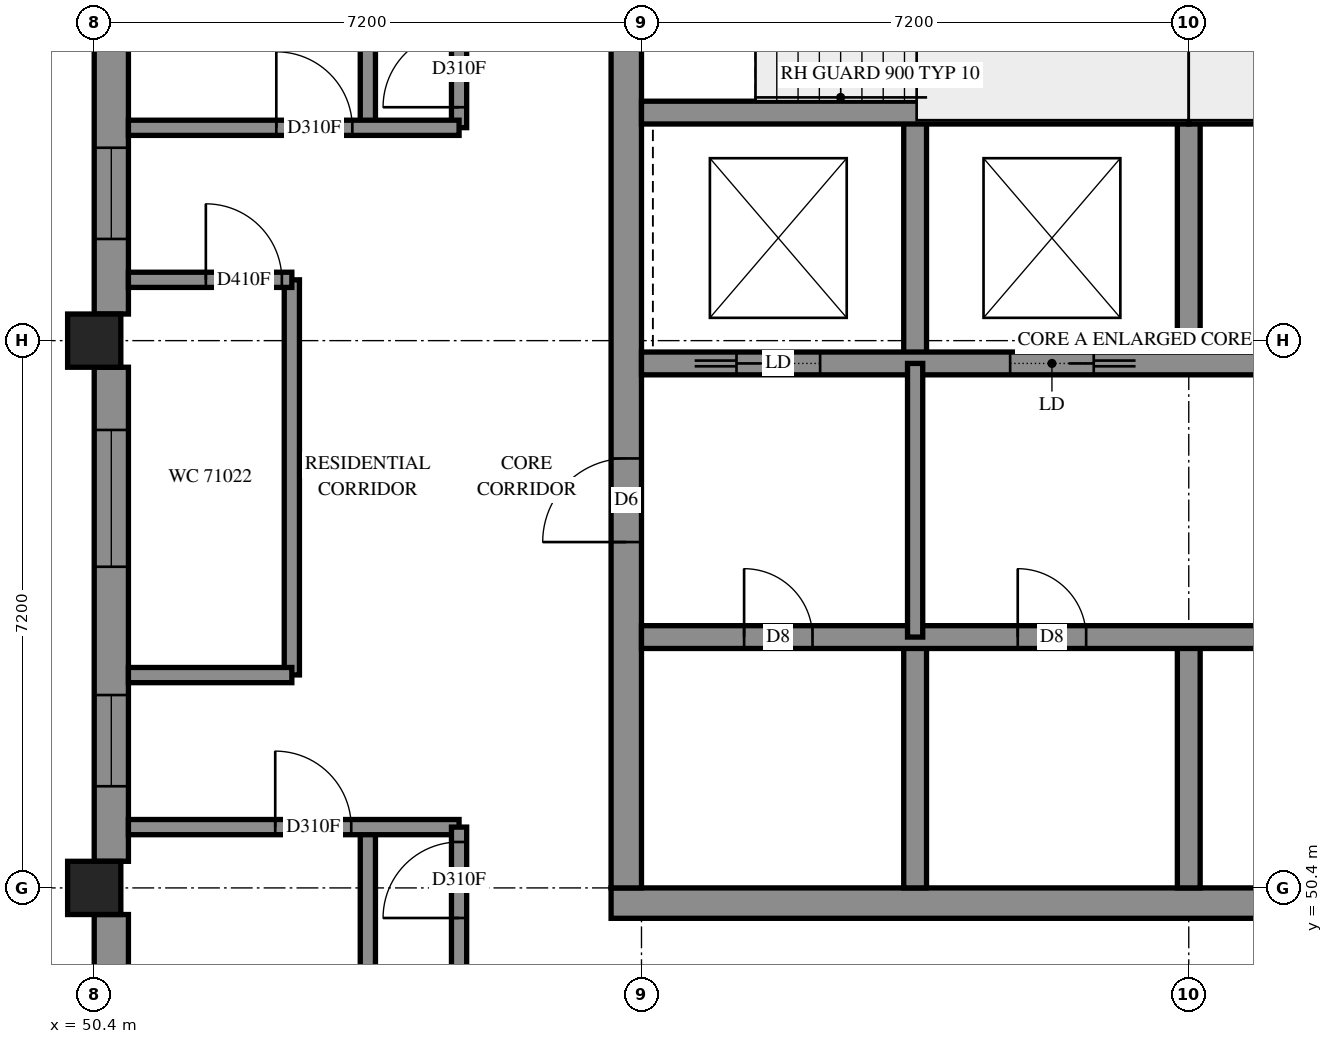
"""IFC4 building model, lengths in metres.
Left out: names, types, materials, properties, quantities, classifications, styles, units other than length and angle.
Written with IfcOpenShell. Run it as: python <this file> out.ifc"""

import sys

from ifc_helpers import new_model, si_unit, direction, frame, frame_2d, origin, origin_2d, place, context, subcontext, project, spatial, rectangle, extrude, element, fill, save


model = new_model("IFC4")
c1 = context("Model", 3, precision=1e-05, world=origin(), true_north=direction((0.0, 1.0)))
c2 = subcontext(c1, "Body", "Model", "MODEL_VIEW")
j1 = project(units=[si_unit("LENGTHUNIT", "METRE"), si_unit("PLANEANGLEUNIT", "RADIAN")], contexts=[c1])
p1 = place(None, origin())
s1 = spatial("IfcSite", under=j1, at=p1, CompositionType="ELEMENT")
p2 = place(p1, origin())
s2 = spatial("IfcBuilding", under=s1, at=p2, CompositionType="ELEMENT")
p3 = place(p2, frame((0.0, 0.0, 260.8)))
s3 = spatial("IfcBuildingStorey", under=s2, at=p3, CompositionType="ELEMENT", Elevation=260.8)
for number, where, z_axis, x_axis in (
    (1, (50.4, 50.4, 0.0), (0.0, 0.0, 1.0), (1.0, 0.0, 0.0)),
    (2, (50.4, 57.6, 0.0), (0.0, 0.0, 1.0), (1.0, 0.0, 0.0)),
):
    element("IfcColumn", number, at=place(p3, frame(where, z_axis=z_axis, x_axis=x_axis)), inside=s3, PredefinedType="COLUMN", context=c2, shape_type="SweptSolid", body=[
        extrude(rectangle(XDim=0.7, YDim=0.7, at=origin_2d()), origin(), (0.0, 0.0, 1.0), 3.1),
    ])
p4 = place(p3, frame((57.2, 50.2, -0.3), z_axis=(0.0, 0.0, 1.0), x_axis=(1.0, 0.0, 0.0)))
e3 = element("IfcWall", 3, at=p4, inside=s3, PredefinedType="SHEAR", context=c2, shape_type="SweptSolid", body=[
    extrude(rectangle(XDim=15.2, YDim=0.4, at=frame_2d((7.6, 0.0))), origin(), (0.0, 0.0, 1.0), 2.7),
])
p5 = place(p3, frame((57.4, 50.4, -0.3), z_axis=(0.0, 0.0, 1.0), x_axis=(0.0, 1.0, 0.0)))
e4 = element("IfcWall", 4, at=p5, inside=s3, PredefinedType="SHEAR", context=c2, shape_type="SweptSolid", body=[
    extrude(rectangle(XDim=14.4, YDim=0.4, at=frame_2d((7.2, 0.0))), origin(), (0.0, 0.0, 1.0), 2.7),
])
p6 = place(p5, frame((4.55, 0.0, 0.3)))
e5 = element("IfcOpeningElement", 5, at=p6, cuts=e4, PredefinedType="OPENING", context=c2, shape_type="SweptSolid", body=[
    extrude(rectangle(XDim=1.1, YDim=2.1, at=frame_2d((0.55, 1.05))), frame((0.0, 0.21, 0.0), z_axis=(0.0, -1.0, 0.0), x_axis=(1.0, 0.0, 0.0)), (0.0, 0.0, 1.0), 0.42),
])
p7 = place(p5, frame((11.35, 0.0, 0.3)))
e6 = element("IfcOpeningElement", 6, at=p7, cuts=e4, PredefinedType="OPENING", context=c2, shape_type="SweptSolid", body=[
    extrude(rectangle(XDim=1.1, YDim=2.1, at=frame_2d((0.55, 1.05))), frame((0.0, 0.21, 0.0), z_axis=(0.0, -1.0, 0.0), x_axis=(1.0, 0.0, 0.0)), (0.0, 0.0, 1.0), 0.42),
])
for number, where, z_axis, x_axis in (
    (7, (61.2, 50.4, 0.0), (0.0, 0.0, 1.0), (0.0, 1.0, 0.0)),
    (8, (61.2, 57.3, 0.0), (0.0, 0.0, 1.0), (0.0, 1.0, 0.0)),
    (9, (64.8, 50.4, 0.0), (0.0, 0.0, 1.0), (0.0, 1.0, 0.0)),
    (10, (64.8, 57.3, 0.0), (0.0, 0.0, 1.0), (0.0, 1.0, 0.0)),
):
    element("IfcWall", number, at=place(p3, frame(where, z_axis=z_axis, x_axis=x_axis)), inside=s3, PredefinedType="SOLIDWALL", context=c2, shape_type="SweptSolid", body=[
        extrude(rectangle(XDim=3.3, YDim=0.3, at=frame_2d((1.65, 0.0))), origin(), (0.0, 0.0, 1.0), 3.1),
    ])
p8 = place(p3, frame((57.6, 53.7, 0.0), z_axis=(0.0, 0.0, 1.0), x_axis=(1.0, 0.0, 0.0)))
e11 = element("IfcWall", 11, at=p8, inside=s3, PredefinedType="SOLIDWALL", context=c2, shape_type="SweptSolid", body=[
    extrude(rectangle(XDim=14.4, YDim=0.3, at=frame_2d((7.2, 0.0))), origin(), (0.0, 0.0, 1.0), 3.1),
])
p9 = place(p8, frame((1.35, 0.0, 0.0)))
e12 = element("IfcOpeningElement", 12, at=p9, cuts=e11, PredefinedType="OPENING", context=c2, shape_type="SweptSolid", body=[
    extrude(rectangle(XDim=0.9, YDim=2.1, at=frame_2d((0.45, 1.05))), frame((0.0, 0.16, 0.0), z_axis=(0.0, -1.0, 0.0), x_axis=(1.0, 0.0, 0.0)), (0.0, 0.0, 1.0), 0.32),
])
p10 = place(p8, frame((4.95, 0.0, 0.0)))
e13 = element("IfcOpeningElement", 13, at=p10, cuts=e11, PredefinedType="OPENING", context=c2, shape_type="SweptSolid", body=[
    extrude(rectangle(XDim=0.9, YDim=2.1, at=frame_2d((0.45, 1.05))), frame((0.0, 0.16, 0.0), z_axis=(0.0, -1.0, 0.0), x_axis=(1.0, 0.0, 0.0)), (0.0, 0.0, 1.0), 0.32),
])
p11 = place(p8, frame((8.55, 0.0, 0.0)))
e14 = element("IfcOpeningElement", 14, at=p11, cuts=e11, PredefinedType="OPENING", context=c2, shape_type="SweptSolid", body=[
    extrude(rectangle(XDim=0.9, YDim=2.1, at=frame_2d((0.45, 1.05))), frame((0.0, 0.16, 0.0), z_axis=(0.0, -1.0, 0.0), x_axis=(1.0, 0.0, 0.0)), (0.0, 0.0, 1.0), 0.32),
])
p12 = place(p8, frame((12.05, 0.0, 0.0)))
e15 = element("IfcOpeningElement", 15, at=p12, cuts=e11, PredefinedType="OPENING", context=c2, shape_type="SweptSolid", body=[
    extrude(rectangle(XDim=1.1, YDim=2.1, at=frame_2d((0.55, 1.05))), frame((0.0, 0.16, 0.0), z_axis=(0.0, -1.0, 0.0), x_axis=(1.0, 0.0, 0.0)), (0.0, 0.0, 1.0), 0.32),
])
p13 = place(p3, frame((57.6, 57.3, 0.0), z_axis=(0.0, 0.0, 1.0), x_axis=(1.0, 0.0, 0.0)))
e16 = element("IfcWall", 16, at=p13, inside=s3, PredefinedType="SOLIDWALL", context=c2, shape_type="SweptSolid", body=[
    extrude(rectangle(XDim=14.4, YDim=0.3, at=frame_2d((7.2, 0.0))), origin(), (0.0, 0.0, 1.0), 3.1),
])
p14 = place(p13, frame((8.55, 0.0, 0.0)))
e17 = element("IfcOpeningElement", 17, at=p14, cuts=e16, PredefinedType="OPENING", context=c2, shape_type="SweptSolid", body=[
    extrude(rectangle(XDim=0.9, YDim=2.1, at=frame_2d((0.45, 1.05))), frame((0.0, 0.16, 0.0), z_axis=(0.0, -1.0, 0.0), x_axis=(1.0, 0.0, 0.0)), (0.0, 0.0, 1.0), 0.32),
])
p15 = place(p13, frame((1.25, 0.0, 0.0)))
e18 = element("IfcOpeningElement", 18, at=p15, cuts=e16, PredefinedType="OPENING", context=c2, shape_type="SweptSolid", body=[
    extrude(rectangle(XDim=1.1, YDim=2.1, at=frame_2d((0.55, 1.05))), frame((0.0, 0.16, 0.0), z_axis=(0.0, -1.0, 0.0), x_axis=(1.0, 0.0, 0.0)), (0.0, 0.0, 1.0), 0.32),
])
p16 = place(p13, frame((4.85, 0.0, 0.0)))
e19 = element("IfcOpeningElement", 19, at=p16, cuts=e16, PredefinedType="OPENING", context=c2, shape_type="SweptSolid", body=[
    extrude(rectangle(XDim=1.1, YDim=2.1, at=frame_2d((0.55, 1.05))), frame((0.0, 0.16, 0.0), z_axis=(0.0, -1.0, 0.0), x_axis=(1.0, 0.0, 0.0)), (0.0, 0.0, 1.0), 0.32),
])
p17 = place(p13, frame((12.05, 0.0, 0.0)))
e20 = element("IfcOpeningElement", 20, at=p17, cuts=e16, PredefinedType="OPENING", context=c2, shape_type="SweptSolid", body=[
    extrude(rectangle(XDim=1.1, YDim=2.1, at=frame_2d((0.55, 1.05))), frame((0.0, 0.16, 0.0), z_axis=(0.0, -1.0, 0.0), x_axis=(1.0, 0.0, 0.0)), (0.0, 0.0, 1.0), 0.32),
])
for number, where, z_axis, x_axis in (
    (21, (57.6, 60.6, 0.0), (0.0, 0.0, 1.0), (1.0, 0.0, 0.0)),
    (22, (64.8, 60.6, 0.0), (0.0, 0.0, 1.0), (1.0, 0.0, 0.0)),
):
    element("IfcWall", number, at=place(p3, frame(where, z_axis=z_axis, x_axis=x_axis)), inside=s3, PredefinedType="SOLIDWALL", context=c2, shape_type="SweptSolid", body=[
        extrude(rectangle(XDim=7.2, YDim=0.3, at=frame_2d((3.6, 0.0))), origin(), (0.0, 0.0, 1.0), 3.1),
    ])
p18 = place(p3, frame((64.8, 60.6, 0.0), z_axis=(0.0, 0.0, 1.0), x_axis=(0.0, 1.0, 0.0)))
e23 = element("IfcWall", 23, at=p18, inside=s3, PredefinedType="SOLIDWALL", context=c2, shape_type="SweptSolid", body=[
    extrude(rectangle(XDim=4.2, YDim=0.3, at=frame_2d((2.1, 0.0))), origin(), (0.0, 0.0, 1.0), 3.1),
])
p19 = place(p3, frame((50.625, 64.45, 0.0), z_axis=(0.0, 0.0, 1.0), x_axis=(0.0, -1.0, 0.0)))
e24 = element("IfcWall", 24, at=p19, inside=s3, PredefinedType="SOLIDWALL", context=c2, shape_type="SweptSolid", body=[
    extrude(rectangle(XDim=6.5, YDim=0.45, at=frame_2d((3.25, 0.0))), origin(), (0.0, 0.0, 1.0), 3.1),
])
p20 = place(p19, frame((0.825, 0.0, 0.7)))
e25 = element("IfcOpeningElement", 25, at=p20, cuts=e24, PredefinedType="OPENING", context=c2, shape_type="SweptSolid", body=[
    extrude(rectangle(XDim=1.8, YDim=1.8, at=frame_2d((0.9, 0.9))), frame((0.0, 0.235, 0.0), z_axis=(0.0, -1.0, 0.0), x_axis=(1.0, 0.0, 0.0)), (0.0, 0.0, 1.0), 0.47),
])
p21 = place(p19, frame((4.312, 0.0, 0.6)))
e26 = element("IfcOpeningElement", 26, at=p21, cuts=e24, PredefinedType="OPENING", context=c2, shape_type="SweptSolid", body=[
    extrude(rectangle(XDim=1.2, YDim=1.9, at=frame_2d((0.6, 0.95))), frame((0.0, 0.235, 0.0), z_axis=(0.0, -1.0, 0.0), x_axis=(1.0, 0.0, 0.0)), (0.0, 0.0, 1.0), 0.47),
])
p22 = place(p3, frame((50.625, 57.25, 0.0), z_axis=(0.0, 0.0, 1.0), x_axis=(0.0, -1.0, 0.0)))
e27 = element("IfcWall", 27, at=p22, inside=s3, PredefinedType="SOLIDWALL", context=c2, shape_type="SweptSolid", body=[
    extrude(rectangle(XDim=6.5, YDim=0.45, at=frame_2d((3.25, 0.0))), origin(), (0.0, 0.0, 1.0), 3.1),
])
p23 = place(p22, frame((0.825, 0.0, 0.7)))
e28 = element("IfcOpeningElement", 28, at=p23, cuts=e27, PredefinedType="OPENING", context=c2, shape_type="SweptSolid", body=[
    extrude(rectangle(XDim=1.8, YDim=1.8, at=frame_2d((0.9, 0.9))), frame((0.0, 0.235, 0.0), z_axis=(0.0, -1.0, 0.0), x_axis=(1.0, 0.0, 0.0)), (0.0, 0.0, 1.0), 0.47),
])
p24 = place(p22, frame((4.312, 0.0, 0.6)))
e29 = element("IfcOpeningElement", 29, at=p24, cuts=e27, PredefinedType="OPENING", context=c2, shape_type="SweptSolid", body=[
    extrude(rectangle(XDim=1.2, YDim=1.9, at=frame_2d((0.6, 0.95))), frame((0.0, 0.235, 0.0), z_axis=(0.0, -1.0, 0.0), x_axis=(1.0, 0.0, 0.0)), (0.0, 0.0, 1.0), 0.47),
])
p25 = place(p3, frame((50.625, 50.05, 0.0), z_axis=(0.0, 0.0, 1.0), x_axis=(0.0, -1.0, 0.0)))
e30 = element("IfcWall", 30, at=p25, inside=s3, PredefinedType="SOLIDWALL", context=c2, shape_type="SweptSolid", body=[
    extrude(rectangle(XDim=6.5, YDim=0.45, at=frame_2d((3.25, 0.0))), origin(), (0.0, 0.0, 1.0), 3.1),
])
p26 = place(p25, frame((0.825, 0.0, 0.7)))
e31 = element("IfcOpeningElement", 31, at=p26, cuts=e30, PredefinedType="OPENING", context=c2, shape_type="SweptSolid", body=[
    extrude(rectangle(XDim=1.8, YDim=1.8, at=frame_2d((0.9, 0.9))), frame((0.0, 0.235, 0.0), z_axis=(0.0, -1.0, 0.0), x_axis=(1.0, 0.0, 0.0)), (0.0, 0.0, 1.0), 0.47),
])
p27 = place(p25, frame((3.875, 0.0, 0.7)))
e32 = element("IfcOpeningElement", 32, at=p27, cuts=e30, PredefinedType="OPENING", context=c2, shape_type="SweptSolid", body=[
    extrude(rectangle(XDim=1.8, YDim=1.8, at=frame_2d((0.9, 0.9))), frame((0.0, 0.235, 0.0), z_axis=(0.0, -1.0, 0.0), x_axis=(1.0, 0.0, 0.0)), (0.0, 0.0, 1.0), 0.47),
])
p28 = place(p3, frame((61.2, 53.7, 0.0), z_axis=(0.0, 0.0, 1.0), x_axis=(0.0, 1.0, 0.0)))
e33 = element("IfcWall", 33, at=p28, inside=s3, PredefinedType="PARTITIONING", context=c2, shape_type="SweptSolid", body=[
    extrude(rectangle(XDim=3.6, YDim=0.2, at=frame_2d((1.8, 0.0))), origin(), (0.0, 0.0, 1.0), 3.1),
])
p29 = place(p3, frame((54.0, 60.4, 0.0), z_axis=(0.0, 0.0, 1.0), x_axis=(0.0, 1.0, 0.0)))
e34 = element("IfcWall", 34, at=p29, inside=s3, PredefinedType="PARTITIONING", context=c2, shape_type="SweptSolid", body=[
    extrude(rectangle(XDim=12.425, YDim=0.2, at=frame_2d((6.212, 0.0))), origin(), (0.0, 0.0, 1.0), 3.1),
])
p30 = place(p3, frame((54.0, 42.303, 0.0), z_axis=(0.0, 0.0, 1.0), x_axis=(0.0, 1.0, 0.0)))
e35 = element("IfcWall", 35, at=p30, inside=s3, PredefinedType="PARTITIONING", context=c2, shape_type="SweptSolid", body=[
    extrude(rectangle(XDim=8.897, YDim=0.2, at=frame_2d((4.448, 0.0))), origin(), (0.0, 0.0, 1.0), 3.1),
])
p31 = place(p3, frame((55.2, 60.402, 0.0), z_axis=(0.0, 0.0, 1.0), x_axis=(0.0, 1.0, 0.0)))
e36 = element("IfcWall", 36, at=p31, inside=s3, PredefinedType="PARTITIONING", context=c2, shape_type="SweptSolid", body=[
    extrude(rectangle(XDim=6.798, YDim=0.2, at=frame_2d((3.399, 0.0))), origin(), (0.0, 0.0, 1.0), 3.1),
])
p32 = place(p31, frame((0.269, 0.0, 0.0)))
e37 = element("IfcOpeningElement", 37, at=p32, cuts=e36, PredefinedType="OPENING", context=c2, shape_type="SweptSolid", body=[
    extrude(rectangle(XDim=1.0, YDim=2.1, at=frame_2d((0.5, 1.05))), frame((0.0, 0.11, 0.0), z_axis=(0.0, -1.0, 0.0), x_axis=(1.0, 0.0, 0.0)), (0.0, 0.0, 1.0), 0.22),
])
p33 = place(p3, frame((53.0, 53.202, 0.0), z_axis=(0.0, 0.0, 1.0), x_axis=(0.0, 1.0, 0.0)))
e38 = element("IfcWall", 38, at=p33, inside=s3, PredefinedType="PARTITIONING", context=c2, shape_type="SweptSolid", body=[
    extrude(rectangle(XDim=5.198, YDim=0.2, at=frame_2d((2.599, 0.0))), origin(), (0.0, 0.0, 1.0), 3.1),
])
p34 = place(p3, frame((50.85, 51.2, 0.0), z_axis=(0.0, 0.0, 1.0), x_axis=(1.0, 0.0, 0.0)))
e39 = element("IfcWall", 39, at=p34, inside=s3, PredefinedType="PARTITIONING", context=c2, shape_type="SweptSolid", body=[
    extrude(rectangle(XDim=4.35, YDim=0.2, at=frame_2d((2.175, 0.0))), origin(), (0.0, 0.0, 1.0), 3.1),
])
p35 = place(p34, frame((1.931, 0.0, 0.0)))
e40 = element("IfcOpeningElement", 40, at=p35, cuts=e39, PredefinedType="OPENING", context=c2, shape_type="SweptSolid", body=[
    extrude(rectangle(XDim=1.0, YDim=2.1, at=frame_2d((0.5, 1.05))), frame((0.0, 0.11, 0.0), z_axis=(0.0, -1.0, 0.0), x_axis=(1.0, 0.0, 0.0)), (0.0, 0.0, 1.0), 0.22),
])
p36 = place(p3, frame((50.85, 60.4, 0.0), z_axis=(0.0, 0.0, 1.0), x_axis=(1.0, 0.0, 0.0)))
e41 = element("IfcWall", 41, at=p36, inside=s3, PredefinedType="PARTITIONING", context=c2, shape_type="SweptSolid", body=[
    extrude(rectangle(XDim=4.35, YDim=0.2, at=frame_2d((2.175, 0.0))), origin(), (0.0, 0.0, 1.0), 3.1),
])
p37 = place(p36, frame((1.946, 0.0, 0.0)))
e42 = element("IfcOpeningElement", 42, at=p37, cuts=e41, PredefinedType="OPENING", context=c2, shape_type="SweptSolid", body=[
    extrude(rectangle(XDim=1.0, YDim=2.1, at=frame_2d((0.5, 1.05))), frame((0.0, 0.11, 0.0), z_axis=(0.0, -1.0, 0.0), x_axis=(1.0, 0.0, 0.0)), (0.0, 0.0, 1.0), 0.22),
])
p38 = place(p3, frame((55.2, 48.0, 0.0), z_axis=(0.0, 0.0, 1.0), x_axis=(0.0, 1.0, 0.0)))
e43 = element("IfcWall", 43, at=p38, inside=s3, PredefinedType="PARTITIONING", context=c2, shape_type="SweptSolid", body=[
    extrude(rectangle(XDim=3.2, YDim=0.2, at=frame_2d((1.6, 0.0))), origin(), (0.0, 0.0, 1.0), 3.1),
])
p39 = place(p38, frame((2.004, 0.0, 0.0)))
e44 = element("IfcOpeningElement", 44, at=p39, cuts=e43, PredefinedType="OPENING", context=c2, shape_type="SweptSolid", body=[
    extrude(rectangle(XDim=1.0, YDim=2.1, at=frame_2d((0.5, 1.05))), frame((0.0, 0.11, 0.0), z_axis=(0.0, -1.0, 0.0), x_axis=(1.0, 0.0, 0.0)), (0.0, 0.0, 1.0), 0.22),
])
p40 = place(p3, frame((50.85, 53.2, 0.0), z_axis=(0.0, 0.0, 1.0), x_axis=(1.0, 0.0, 0.0)))
e45 = element("IfcWall", 45, at=p40, inside=s3, PredefinedType="PARTITIONING", context=c2, shape_type="SweptSolid", body=[
    extrude(rectangle(XDim=2.15, YDim=0.2, at=frame_2d((1.075, 0.0))), origin(), (0.0, 0.0, 1.0), 3.1),
])
p41 = place(p3, frame((50.85, 58.4, 0.0), z_axis=(0.0, 0.0, 1.0), x_axis=(1.0, 0.0, 0.0)))
e46 = element("IfcWall", 46, at=p41, inside=s3, PredefinedType="PARTITIONING", context=c2, shape_type="SweptSolid", body=[
    extrude(rectangle(XDim=2.15, YDim=0.2, at=frame_2d((1.075, 0.0))), origin(), (0.0, 0.0, 1.0), 3.1),
])
p42 = place(p41, frame((1.019, 0.0, 0.0)))
e47 = element("IfcOpeningElement", 47, at=p42, cuts=e46, PredefinedType="OPENING", context=c2, shape_type="SweptSolid", body=[
    extrude(rectangle(XDim=1.0, YDim=2.1, at=frame_2d((0.5, 1.05))), frame((0.0, 0.11, 0.0), z_axis=(0.0, -1.0, 0.0), x_axis=(1.0, 0.0, 0.0)), (0.0, 0.0, 1.0), 0.22),
])
p43 = place(p23, origin())
e48 = element("IfcWindow", 48, at=p43, inside=s3, PartitioningType="SINGLE_PANEL", PredefinedType="WINDOW", context=c2, shape_type="SweptSolid", body=[
    extrude(rectangle(XDim=1.8, YDim=1.8, at=frame_2d((0.9, 0.9))), frame((0.0, 0.205, 0.0), z_axis=(0.0, -1.0, 0.0), x_axis=(1.0, 0.0, 0.0)), (0.0, 0.0, 1.0), 0.06),
])
fill(e28, e48)
p44 = place(p6, origin())
e49 = element("IfcDoor", 49, at=p44, inside=s3, OperationType="DOUBLE_DOOR_SINGLE_SWING", PredefinedType="DOOR", context=c2, shape_type="SweptSolid", body=[
    extrude(rectangle(XDim=1.1, YDim=2.1, at=frame_2d((0.55, 1.05))), frame((0.0, 0.025, 0.0), z_axis=(0.0, -1.0, 0.0), x_axis=(1.0, 0.0, 0.0)), (0.0, 0.0, 1.0), 0.05),
])
fill(e5, e49)
p45 = place(p9, origin())
e50 = element("IfcDoor", 50, at=p45, inside=s3, OperationType="SINGLE_SWING_LEFT", PredefinedType="DOOR", context=c2, shape_type="SweptSolid", body=[
    extrude(rectangle(XDim=0.9, YDim=2.1, at=frame_2d((0.45, 1.05))), frame((0.0, 0.025, 0.0), z_axis=(0.0, -1.0, 0.0), x_axis=(1.0, 0.0, 0.0)), (0.0, 0.0, 1.0), 0.05),
])
fill(e12, e50)
p46 = place(p10, origin())
e51 = element("IfcDoor", 51, at=p46, inside=s3, OperationType="SINGLE_SWING_LEFT", PredefinedType="DOOR", context=c2, shape_type="SweptSolid", body=[
    extrude(rectangle(XDim=0.9, YDim=2.1, at=frame_2d((0.45, 1.05))), frame((0.0, 0.025, 0.0), z_axis=(0.0, -1.0, 0.0), x_axis=(1.0, 0.0, 0.0)), (0.0, 0.0, 1.0), 0.05),
])
fill(e13, e51)
p47 = place(p15, origin())
e52 = element("IfcDoor", 52, at=p47, inside=s3, OperationType="SLIDING_TO_LEFT", PredefinedType="DOOR", context=c2, shape_type="SweptSolid", body=[
    extrude(rectangle(XDim=1.1, YDim=2.1, at=frame_2d((0.55, 1.05))), frame((0.0, 0.025, 0.0), z_axis=(0.0, -1.0, 0.0), x_axis=(1.0, 0.0, 0.0)), (0.0, 0.0, 1.0), 0.05),
])
fill(e18, e52)
p48 = place(p16, origin())
e53 = element("IfcDoor", 53, at=p48, inside=s3, OperationType="SLIDING_TO_RIGHT", PredefinedType="DOOR", context=c2, shape_type="SweptSolid", body=[
    extrude(rectangle(XDim=1.1, YDim=2.1, at=frame_2d((0.55, 1.05))), frame((0.0, 0.025, 0.0), z_axis=(0.0, -1.0, 0.0), x_axis=(1.0, 0.0, 0.0)), (0.0, 0.0, 1.0), 0.05),
])
fill(e19, e53)
p49 = place(p35, origin())
e54 = element("IfcDoor", 54, at=p49, inside=s3, OperationType="SINGLE_SWING_LEFT", PredefinedType="DOOR", context=c2, shape_type="SweptSolid", body=[
    extrude(rectangle(XDim=1.0, YDim=2.1, at=frame_2d((0.5, 1.05))), frame((0.0, 0.025, 0.0), z_axis=(0.0, -1.0, 0.0), x_axis=(1.0, 0.0, 0.0)), (0.0, 0.0, 1.0), 0.05),
])
fill(e40, e54)
p50 = place(p39, origin())
e55 = element("IfcDoor", 55, at=p50, inside=s3, OperationType="SINGLE_SWING_RIGHT", PredefinedType="DOOR", context=c2, shape_type="SweptSolid", body=[
    extrude(rectangle(XDim=1.0, YDim=2.1, at=frame_2d((0.5, 1.05))), frame((0.0, 0.025, 0.0), z_axis=(0.0, -1.0, 0.0), x_axis=(1.0, 0.0, 0.0)), (0.0, 0.0, 1.0), 0.05),
])
fill(e44, e55)
p51 = place(p42, origin())
e56 = element("IfcDoor", 56, at=p51, inside=s3, OperationType="SINGLE_SWING_LEFT", PredefinedType="DOOR", context=c2, shape_type="SweptSolid", body=[
    extrude(rectangle(XDim=1.0, YDim=2.1, at=frame_2d((0.5, 1.05))), frame((0.0, 0.025, 0.0), z_axis=(0.0, -1.0, 0.0), x_axis=(1.0, 0.0, 0.0)), (0.0, 0.0, 1.0), 0.05),
])
fill(e47, e56)
p52 = place(p37, origin())
e57 = element("IfcDoor", 57, at=p52, inside=s3, OperationType="SINGLE_SWING_RIGHT", PredefinedType="DOOR", context=c2, shape_type="SweptSolid", body=[
    extrude(rectangle(XDim=1.0, YDim=2.1, at=frame_2d((0.5, 1.05))), frame((0.0, 0.025, 0.0), z_axis=(0.0, -1.0, 0.0), x_axis=(1.0, 0.0, 0.0)), (0.0, 0.0, 1.0), 0.05),
])
fill(e42, e57)
p53 = place(p32, origin())
e58 = element("IfcDoor", 58, at=p53, inside=s3, OperationType="SINGLE_SWING_LEFT", PredefinedType="DOOR", context=c2, shape_type="SweptSolid", body=[
    extrude(rectangle(XDim=1.0, YDim=2.1, at=frame_2d((0.5, 1.05))), frame((0.0, 0.025, 0.0), z_axis=(0.0, -1.0, 0.0), x_axis=(1.0, 0.0, 0.0)), (0.0, 0.0, 1.0), 0.05),
])
fill(e37, e58)
p54 = place(p21, origin())
e59 = element("IfcWindow", 59, at=p54, inside=s3, PartitioningType="SINGLE_PANEL", PredefinedType="WINDOW", context=c2, shape_type="SweptSolid", body=[
    extrude(rectangle(XDim=1.2, YDim=1.9, at=frame_2d((0.6, 0.95))), frame((0.0, 0.205, 0.0), z_axis=(0.0, -1.0, 0.0), x_axis=(1.0, 0.0, 0.0)), (0.0, 0.0, 1.0), 0.06),
])
fill(e26, e59)
p55 = place(p24, origin())
e60 = element("IfcWindow", 60, at=p55, inside=s3, PartitioningType="SINGLE_PANEL", PredefinedType="WINDOW", context=c2, shape_type="SweptSolid", body=[
    extrude(rectangle(XDim=1.2, YDim=1.9, at=frame_2d((0.6, 0.95))), frame((0.0, 0.205, 0.0), z_axis=(0.0, -1.0, 0.0), x_axis=(1.0, 0.0, 0.0)), (0.0, 0.0, 1.0), 0.06),
])
fill(e29, e60)
save(model, sys.argv[1])
